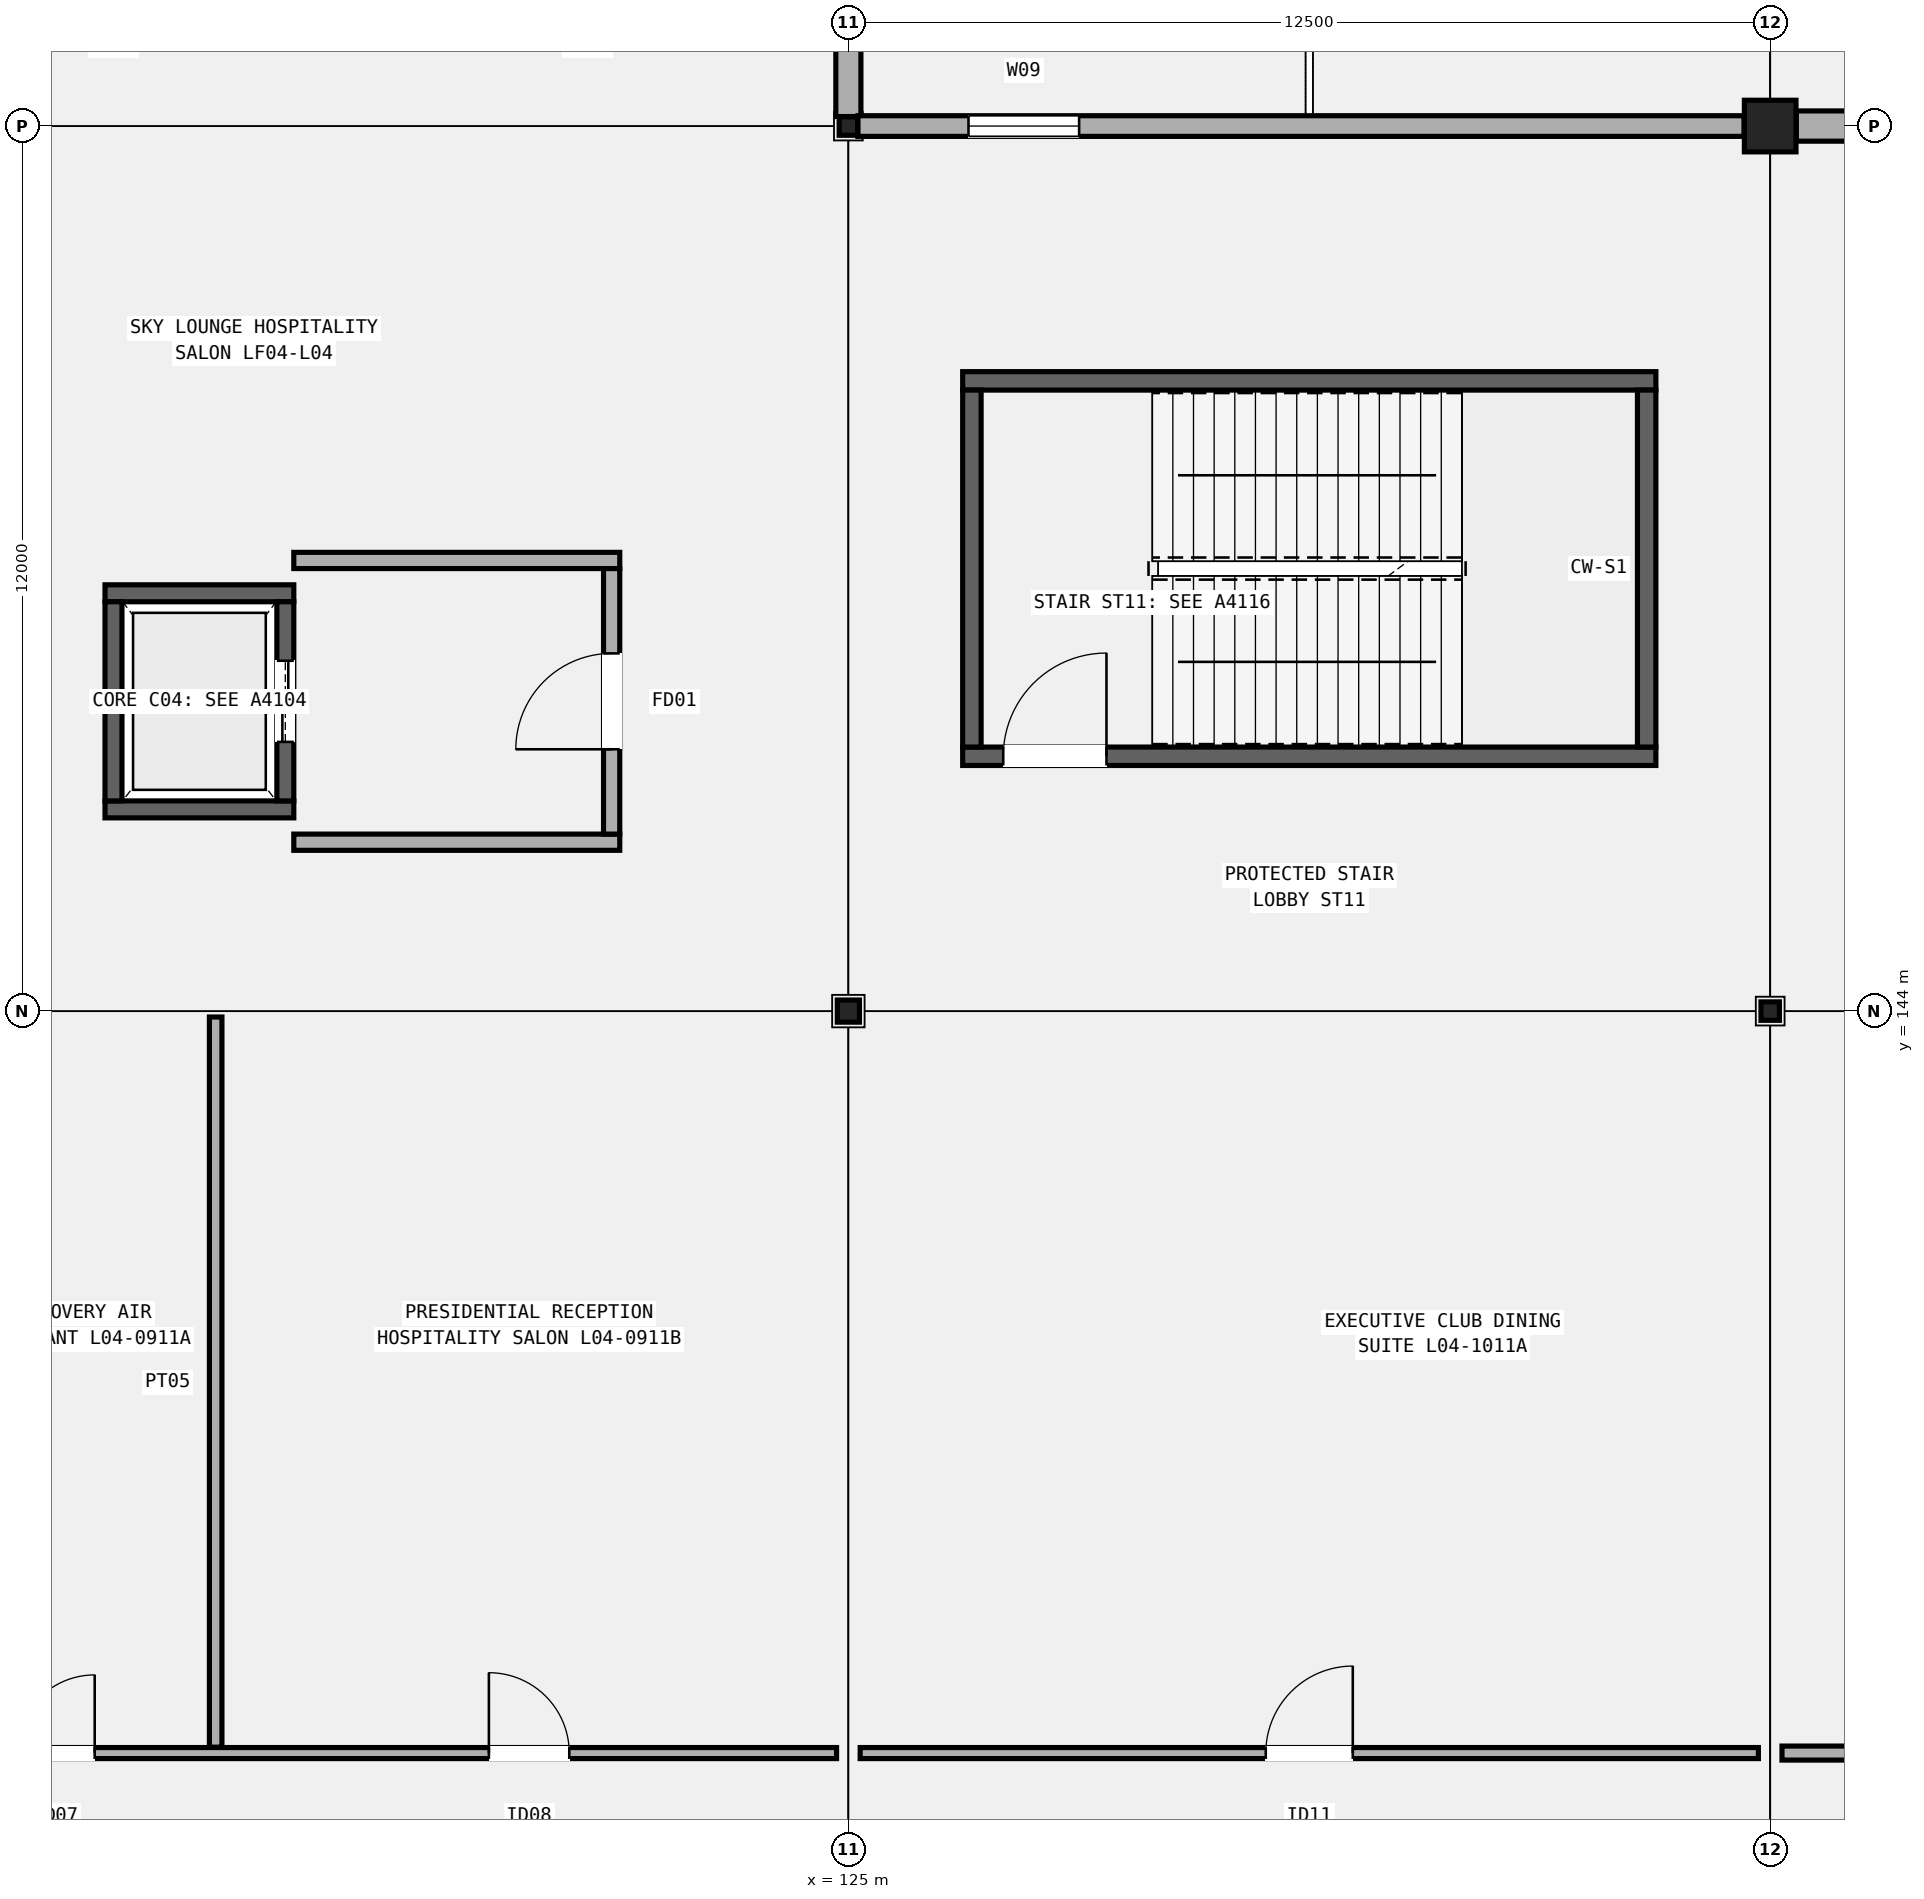
"""IFC4 building model, lengths in metres.
Left out: names, types, materials, properties, quantities, classifications, styles, units other than length and angle.
Written with IfcOpenShell. Run it as: python <this file> out.ifc"""

import sys

from ifc_helpers import new_model, si_unit, direction, frame, frame_2d, origin, origin_2d, place, context, subcontext, project, spatial, rectangle, hollow_rectangle, extrude, element, fill, save


model = new_model("IFC4")
c1 = context("Model", 3, precision=1e-05, world=origin(), true_north=direction((0.0, 1.0)))
c2 = subcontext(c1, "Body", "Model", "MODEL_VIEW")
j1 = project(units=[si_unit("LENGTHUNIT", "METRE"), si_unit("PLANEANGLEUNIT", "RADIAN")], contexts=[c1])
p1 = place(None, origin())
s1 = spatial("IfcSite", under=j1, at=p1, CompositionType="ELEMENT")
p2 = place(p1, origin())
s2 = spatial("IfcBuilding", under=s1, at=p2, CompositionType="ELEMENT")
p3 = place(p2, frame((0.0, 0.0, 20.4)))
s3 = spatial("IfcBuildingStorey", under=s2, at=p3, CompositionType="ELEMENT", Elevation=20.4)
p4 = place(p3, frame((125.0, 144.0, 0.0), z_axis=(0.0, 0.0, 1.0), x_axis=(1.0, 0.0, 0.0)))
e1 = element("IfcColumn", 1, at=p4, inside=s3, PredefinedType="COLUMN", context=c2, shape_type="SweptSolid", body=[
    extrude(hollow_rectangle(XDim=0.3, YDim=0.3, WallThickness=0.012, InnerFilletRadius=0.012, OuterFilletRadius=0.024, at=origin_2d()), origin(), (0.0, 0.0, 1.0), 5.4),
])
for number, where, z_axis, x_axis in (
    (2, (125.0, 156.0, 0.0), (0.0, 0.0, 1.0), (1.0, 0.0, 0.0)),
    (3, (137.5, 144.0, 0.0), (0.0, 0.0, 1.0), (1.0, 0.0, 0.0)),
):
    element("IfcColumn", number, at=place(p3, frame(where, z_axis=z_axis, x_axis=x_axis)), inside=s3, PredefinedType="COLUMN", context=c2, shape_type="SweptSolid", body=[
        extrude(hollow_rectangle(XDim=0.25, YDim=0.25, WallThickness=0.012, InnerFilletRadius=0.012, OuterFilletRadius=0.024, at=origin_2d()), origin(), (0.0, 0.0, 1.0), 5.4),
    ])
p5 = place(p3, frame((137.5, 156.0, 0.0), z_axis=(0.0, 0.0, 1.0), x_axis=(1.0, 0.0, 0.0)))
e4 = element("IfcColumn", 4, at=p5, inside=s3, PredefinedType="COLUMN", context=c2, shape_type="SweptSolid", body=[
    extrude(rectangle(XDim=0.7, YDim=0.7, at=origin_2d()), origin(), (0.0, 0.0, 1.0), 5.4),
])
p6 = place(p3, frame((125.0, 156.129, 0.0), z_axis=(0.0, 0.0, 1.0), x_axis=(0.0, 1.0, 0.0)))
e5 = element("IfcWall", 5, at=p6, inside=s3, PredefinedType="SOLIDWALL", context=c2, shape_type="SweptSolid", body=[
    extrude(rectangle(XDim=11.517, YDim=0.34, at=frame_2d((5.759, 0.0))), origin(), (0.0, 0.0, 1.0), 4.592),
])
p7 = place(p6, frame((2.441, 0.0, 0.95)))
e6 = element("IfcOpeningElement", 6, at=p7, cuts=e5, PredefinedType="OPENING", context=c2, shape_type="SweptSolid", body=[
    extrude(rectangle(XDim=1.35, YDim=2.0, at=frame_2d((0.675, 1.0))), frame((0.0, 0.18, 0.0), z_axis=(0.0, -1.0, 0.0), x_axis=(1.0, 0.0, 0.0)), (0.0, 0.0, 1.0), 0.36),
])
p8 = place(p3, frame((125.129, 156.0, 0.0), z_axis=(0.0, 0.0, 1.0), x_axis=(1.0, 0.0, 0.0)))
e7 = element("IfcWall", 7, at=p8, inside=s3, PredefinedType="SOLIDWALL", context=c2, shape_type="SweptSolid", body=[
    extrude(rectangle(XDim=12.017, YDim=0.28, at=frame_2d((6.009, 0.0))), origin(), (0.0, 0.0, 1.0), 4.592),
])
p9 = place(p8, frame((1.5, 0.0, 0.95)))
e8 = element("IfcOpeningElement", 8, at=p9, cuts=e7, PredefinedType="OPENING", context=c2, shape_type="SweptSolid", body=[
    extrude(rectangle(XDim=1.5, YDim=1.8, at=frame_2d((0.75, 0.9))), frame((0.0, 0.15, 0.0), z_axis=(0.0, -1.0, 0.0), x_axis=(1.0, 0.0, 0.0)), (0.0, 0.0, 1.0), 0.3),
])
p10 = place(p3, frame((137.854, 156.0, 0.0), z_axis=(0.0, 0.0, 1.0), x_axis=(1.0, 0.0, 0.0)))
e9 = element("IfcWall", 9, at=p10, inside=s3, PredefinedType="SOLIDWALL", context=c2, shape_type="SweptSolid", body=[
    extrude(rectangle(XDim=11.842, YDim=0.41, at=frame_2d((5.921, 0.0))), origin(), (0.0, 0.0, 1.0), 4.48),
])
p11 = place(p10, frame((1.5, 0.0, 0.95)))
e10 = element("IfcOpeningElement", 10, at=p11, cuts=e9, PredefinedType="OPENING", context=c2, shape_type="SweptSolid", body=[
    extrude(rectangle(XDim=1.65, YDim=2.05, at=frame_2d((0.825, 1.025))), frame((0.0, 0.215, 0.0), z_axis=(0.0, -1.0, 0.0), x_axis=(1.0, 0.0, 0.0)), (0.0, 0.0, 1.0), 0.43),
])
p12 = place(p3, frame((126.55, 147.455, 0.0), z_axis=(0.0, 0.0, 1.0), x_axis=(1.0, 0.0, 0.0)))
e11 = element("IfcWall", 11, at=p12, inside=s3, PredefinedType="SHEAR", context=c2, shape_type="SweptSolid", body=[
    extrude(rectangle(XDim=9.4, YDim=0.25, at=frame_2d((4.7, 0.0))), origin(), (0.0, 0.0, 1.0), 5.18),
])
p13 = place(p12, frame((0.55, 0.0, 0.0)))
e12 = element("IfcOpeningElement", 12, at=p13, cuts=e11, PredefinedType="OPENING", context=c2, shape_type="SweptSolid", body=[
    extrude(rectangle(XDim=1.4, YDim=2.15, at=frame_2d((0.7, 1.075))), frame((0.0, 0.135, 0.0), z_axis=(0.0, -1.0, 0.0), x_axis=(1.0, 0.0, 0.0)), (0.0, 0.0, 1.0), 0.27),
])
p14 = place(p3, frame((126.55, 152.545, 0.0), z_axis=(0.0, 0.0, 1.0), x_axis=(1.0, 0.0, 0.0)))
e13 = element("IfcWall", 13, at=p14, inside=s3, PredefinedType="SHEAR", context=c2, shape_type="SweptSolid", body=[
    extrude(rectangle(XDim=9.4, YDim=0.25, at=frame_2d((4.7, 0.0))), origin(), (0.0, 0.0, 1.0), 5.18),
])
for number, where, z_axis, x_axis in (
    (14, (126.675, 147.58, 0.0), (0.0, 0.0, 1.0), (0.0, 1.0, 0.0)),
    (15, (135.825, 147.58, 0.0), (0.0, 0.0, 1.0), (0.0, 1.0, 0.0)),
):
    element("IfcWall", number, at=place(p3, frame(where, z_axis=z_axis, x_axis=x_axis)), inside=s3, PredefinedType="SHEAR", context=c2, shape_type="SweptSolid", body=[
        extrude(rectangle(XDim=4.84, YDim=0.25, at=frame_2d((2.42, 0.0))), origin(), (0.0, 0.0, 1.0), 5.18),
    ])
for number, where, z_axis, x_axis in (
    (16, (114.92, 146.735, 0.0), (0.0, 0.0, 1.0), (1.0, 0.0, 0.0)),
    (17, (114.92, 149.665, 0.0), (0.0, 0.0, 1.0), (1.0, 0.0, 0.0)),
):
    element("IfcWall", number, at=place(p3, frame(where, z_axis=z_axis, x_axis=x_axis)), inside=s3, PredefinedType="SHEAR", context=c2, shape_type="SweptSolid", body=[
        extrude(rectangle(XDim=2.56, YDim=0.23, at=frame_2d((1.28, 0.0))), origin(), (0.0, 0.0, 1.0), 5.18),
    ])
p15 = place(p3, frame((115.035, 146.85, 0.0), z_axis=(0.0, 0.0, 1.0), x_axis=(0.0, 1.0, 0.0)))
e18 = element("IfcWall", 18, at=p15, inside=s3, PredefinedType="SHEAR", context=c2, shape_type="SweptSolid", body=[
    extrude(rectangle(XDim=2.7, YDim=0.23, at=frame_2d((1.35, 0.0))), origin(), (0.0, 0.0, 1.0), 5.18),
])
p16 = place(p3, frame((117.365, 146.85, 0.0), z_axis=(0.0, 0.0, 1.0), x_axis=(0.0, 1.0, 0.0)))
e19 = element("IfcWall", 19, at=p16, inside=s3, PredefinedType="SHEAR", context=c2, shape_type="SweptSolid", body=[
    extrude(rectangle(XDim=2.7, YDim=0.23, at=frame_2d((1.35, 0.0))), origin(), (0.0, 0.0, 1.0), 5.18),
])
p17 = place(p16, frame((0.8, 0.0, 0.0)))
e20 = element("IfcOpeningElement", 20, at=p17, cuts=e19, PredefinedType="OPENING", context=c2, shape_type="SweptSolid", body=[
    extrude(rectangle(XDim=1.1, YDim=2.15, at=frame_2d((0.55, 1.075))), frame((0.0, 0.125, 0.0), z_axis=(0.0, -1.0, 0.0), x_axis=(1.0, 0.0, 0.0)), (0.0, 0.0, 1.0), 0.25),
])
for number, where, z_axis, x_axis in (
    (21, (117.48, 146.29, 0.0), (0.0, 0.0, 1.0), (1.0, 0.0, 0.0)),
    (22, (117.48, 150.11, 0.0), (0.0, 0.0, 1.0), (1.0, 0.0, 0.0)),
):
    element("IfcWall", number, at=place(p3, frame(where, z_axis=z_axis, x_axis=x_axis)), inside=s3, PredefinedType="SOLIDWALL", context=c2, shape_type="SweptSolid", body=[
        extrude(rectangle(XDim=4.42, YDim=0.22, at=frame_2d((2.21, 0.0))), origin(), (0.0, 0.0, 1.0), 4.52),
    ])
p18 = place(p3, frame((121.79, 146.4, 0.0), z_axis=(0.0, 0.0, 1.0), x_axis=(0.0, 1.0, 0.0)))
e23 = element("IfcWall", 23, at=p18, inside=s3, PredefinedType="SOLIDWALL", context=c2, shape_type="SweptSolid", body=[
    extrude(rectangle(XDim=3.6, YDim=0.22, at=frame_2d((1.8, 0.0))), origin(), (0.0, 0.0, 1.0), 4.52),
])
p19 = place(p18, frame((1.15, 0.0, 0.0)))
e24 = element("IfcOpeningElement", 24, at=p19, cuts=e23, PredefinedType="OPENING", context=c2, shape_type="SweptSolid", body=[
    extrude(rectangle(XDim=1.3, YDim=2.15, at=frame_2d((0.65, 1.075))), frame((0.0, 0.12, 0.0), z_axis=(0.0, -1.0, 0.0), x_axis=(1.0, 0.0, 0.0)), (0.0, 0.0, 1.0), 0.24),
])
p20 = place(p3, frame((112.16, 133.94, 0.0), z_axis=(0.0, 0.0, 1.0), x_axis=(1.0, 0.0, 0.0)))
e25 = element("IfcWall", 25, at=p20, inside=s3, PredefinedType="PARTITIONING", context=c2, shape_type="SweptSolid", body=[
    extrude(rectangle(XDim=12.68, YDim=0.15, at=frame_2d((6.34, 0.0))), origin(), (0.0, 0.0, 1.0), 4.52),
])
p21 = place(p20, frame((1.56, 0.0, 0.0)))
e26 = element("IfcOpeningElement", 26, at=p21, cuts=e25, PredefinedType="OPENING", context=c2, shape_type="SweptSolid", body=[
    extrude(rectangle(XDim=1.06, YDim=2.15, at=frame_2d((0.53, 1.075))), frame((0.0, 0.085, 0.0), z_axis=(0.0, -1.0, 0.0), x_axis=(1.0, 0.0, 0.0)), (0.0, 0.0, 1.0), 0.17),
])
p22 = place(p20, frame((7.965, 0.0, 0.0)))
e27 = element("IfcOpeningElement", 27, at=p22, cuts=e25, PredefinedType="OPENING", context=c2, shape_type="SweptSolid", body=[
    extrude(rectangle(XDim=1.09, YDim=2.16, at=frame_2d((0.545, 1.08))), frame((0.0, 0.085, 0.0), z_axis=(0.0, -1.0, 0.0), x_axis=(1.0, 0.0, 0.0)), (0.0, 0.0, 1.0), 0.17),
])
p23 = place(p3, frame((116.42, 134.02, 0.0), z_axis=(0.0, 0.0, 1.0), x_axis=(0.0, 1.0, 0.0)))
e28 = element("IfcWall", 28, at=p23, inside=s3, PredefinedType="PARTITIONING", context=c2, shape_type="SweptSolid", body=[
    extrude(rectangle(XDim=9.9, YDim=0.17, at=frame_2d((4.95, 0.0))), origin(), (0.0, 0.0, 1.0), 4.52),
])
p24 = place(p3, frame((125.16, 133.94, 0.0), z_axis=(0.0, 0.0, 1.0), x_axis=(1.0, 0.0, 0.0)))
e29 = element("IfcWall", 29, at=p24, inside=s3, PredefinedType="PARTITIONING", context=c2, shape_type="SweptSolid", body=[
    extrude(rectangle(XDim=12.18, YDim=0.15, at=frame_2d((6.09, 0.0))), origin(), (0.0, 0.0, 1.0), 4.52),
])
p25 = place(p24, frame((5.5, 0.0, 0.0)))
e30 = element("IfcOpeningElement", 30, at=p25, cuts=e29, PredefinedType="OPENING", context=c2, shape_type="SweptSolid", body=[
    extrude(rectangle(XDim=1.18, YDim=2.2, at=frame_2d((0.59, 1.1))), frame((0.0, 0.085, 0.0), z_axis=(0.0, -1.0, 0.0), x_axis=(1.0, 0.0, 0.0)), (0.0, 0.0, 1.0), 0.17),
])
p26 = place(p3, frame((137.66, 133.94, 0.0), z_axis=(0.0, 0.0, 1.0), x_axis=(1.0, 0.0, 0.0)))
e31 = element("IfcWall", 31, at=p26, inside=s3, PredefinedType="PARTITIONING", context=c2, shape_type="SweptSolid", body=[
    extrude(rectangle(XDim=12.18, YDim=0.19, at=frame_2d((6.09, 0.0))), origin(), (0.0, 0.0, 1.0), 4.52),
])
p27 = place(p26, frame((2.461, 0.0, 0.0)))
e32 = element("IfcOpeningElement", 32, at=p27, cuts=e31, PredefinedType="OPENING", context=c2, shape_type="SweptSolid", body=[
    extrude(rectangle(XDim=1.21, YDim=2.18, at=frame_2d((0.605, 1.09))), frame((0.0, 0.105, 0.0), z_axis=(0.0, -1.0, 0.0), x_axis=(1.0, 0.0, 0.0)), (0.0, 0.0, 1.0), 0.21),
])
p28 = place(p26, frame((8.616, 0.0, 0.0)))
e33 = element("IfcOpeningElement", 33, at=p28, cuts=e31, PredefinedType="OPENING", context=c2, shape_type="SweptSolid", body=[
    extrude(rectangle(XDim=1.24, YDim=2.22, at=frame_2d((0.62, 1.11))), frame((0.0, 0.105, 0.0), z_axis=(0.0, -1.0, 0.0), x_axis=(1.0, 0.0, 0.0)), (0.0, 0.0, 1.0), 0.21),
])
p29 = place(p9, origin())
e34 = element("IfcWindow", 34, at=p29, inside=s3, PartitioningType="SINGLE_PANEL", PredefinedType="WINDOW", context=c2, shape_type="SweptSolid", body=[
    extrude(rectangle(XDim=1.5, YDim=1.8, at=frame_2d((0.75, 0.9))), frame((0.0, 0.03, 0.0), z_axis=(0.0, -1.0, 0.0), x_axis=(1.0, 0.0, 0.0)), (0.0, 0.0, 1.0), 0.06),
])
fill(e8, e34)
p30 = place(p13, origin())
e35 = element("IfcDoor", 35, at=p30, inside=s3, OperationType="SINGLE_SWING_RIGHT", PredefinedType="DOOR", context=c2, shape_type="SweptSolid", body=[
    extrude(rectangle(XDim=1.4, YDim=2.15, at=frame_2d((0.7, 1.075))), frame((0.0, 0.025, 0.0), z_axis=(0.0, -1.0, 0.0), x_axis=(1.0, 0.0, 0.0)), (0.0, 0.0, 1.0), 0.05),
])
fill(e12, e35)
p31 = place(p17, origin())
e36 = element("IfcDoor", 36, at=p31, inside=s3, OperationType="DOUBLE_DOOR_SLIDING", PredefinedType="DOOR", context=c2, shape_type="SweptSolid", body=[
    extrude(rectangle(XDim=1.1, YDim=2.15, at=frame_2d((0.55, 1.075))), frame((0.0, 0.025, 0.0), z_axis=(0.0, -1.0, 0.0), x_axis=(1.0, 0.0, 0.0)), (0.0, 0.0, 1.0), 0.05),
])
fill(e20, e36)
p32 = place(p19, origin())
e37 = element("IfcDoor", 37, at=p32, inside=s3, OperationType="SINGLE_SWING_LEFT", PredefinedType="DOOR", context=c2, shape_type="SweptSolid", body=[
    extrude(rectangle(XDim=1.3, YDim=2.15, at=frame_2d((0.65, 1.075))), frame((0.0, 0.025, 0.0), z_axis=(0.0, -1.0, 0.0), x_axis=(1.0, 0.0, 0.0)), (0.0, 0.0, 1.0), 0.05),
])
fill(e24, e37)
p33 = place(p21, origin())
e38 = element("IfcDoor", 38, at=p33, inside=s3, OperationType="SINGLE_SWING_RIGHT", PredefinedType="DOOR", context=c2, shape_type="SweptSolid", body=[
    extrude(rectangle(XDim=1.06, YDim=2.15, at=frame_2d((0.53, 1.075))), frame((0.0, 0.025, 0.0), z_axis=(0.0, -1.0, 0.0), x_axis=(1.0, 0.0, 0.0)), (0.0, 0.0, 1.0), 0.05),
])
fill(e26, e38)
p34 = place(p22, origin())
e39 = element("IfcDoor", 39, at=p34, inside=s3, OperationType="SINGLE_SWING_LEFT", PredefinedType="DOOR", context=c2, shape_type="SweptSolid", body=[
    extrude(rectangle(XDim=1.09, YDim=2.16, at=frame_2d((0.545, 1.08))), frame((0.0, 0.025, 0.0), z_axis=(0.0, -1.0, 0.0), x_axis=(1.0, 0.0, 0.0)), (0.0, 0.0, 1.0), 0.05),
])
fill(e27, e39)
p35 = place(p25, origin())
e40 = element("IfcDoor", 40, at=p35, inside=s3, OperationType="SINGLE_SWING_RIGHT", PredefinedType="DOOR", context=c2, shape_type="SweptSolid", body=[
    extrude(rectangle(XDim=1.18, YDim=2.2, at=frame_2d((0.59, 1.1))), frame((0.0, 0.025, 0.0), z_axis=(0.0, -1.0, 0.0), x_axis=(1.0, 0.0, 0.0)), (0.0, 0.0, 1.0), 0.05),
])
fill(e30, e40)
save(model, sys.argv[1])
